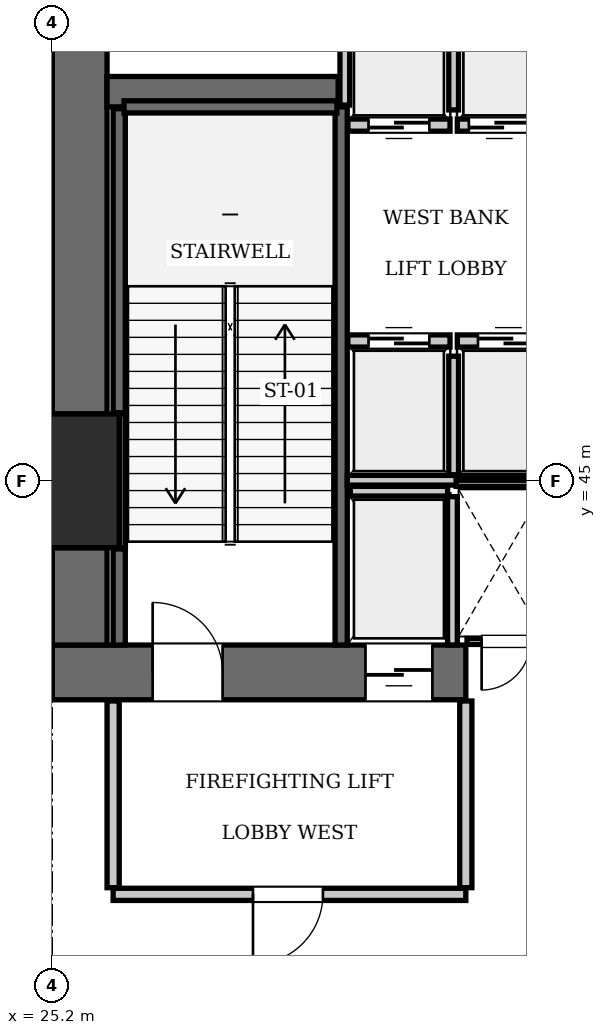
"""IFC4 building model, lengths in metres.
Left out: names, types, materials, properties, quantities, classifications, styles, units other than length and angle.
Written with IfcOpenShell. Run it as: python <this file> out.ifc"""

import sys

from ifc_helpers import new_model, si_unit, direction, frame, frame_2d, origin, origin_2d, place, context, subcontext, project, spatial, rectangle, extrude, element, fill, save


model = new_model("IFC4")
c1 = context("Model", 3, precision=1e-05, world=origin(), true_north=direction((0.0, 1.0)))
c2 = subcontext(c1, "Body", "Model", "MODEL_VIEW")
j1 = project(units=[si_unit("LENGTHUNIT", "METRE"), si_unit("PLANEANGLEUNIT", "RADIAN")], contexts=[c1])
p1 = place(None, origin())
s1 = spatial("IfcSite", under=j1, at=p1, CompositionType="ELEMENT")
p2 = place(p1, origin())
s2 = spatial("IfcBuilding", under=s1, at=p2, CompositionType="ELEMENT")
p3 = place(p2, frame((0.0, 0.0, 21.35)))
s3 = spatial("IfcBuildingStorey", under=s2, at=p3, CompositionType="ELEMENT", Elevation=21.35)
p4 = place(p3, frame((25.2, 45.0, 0.0), z_axis=(0.0, 0.0, 1.0), x_axis=(1.0, 0.0, 0.0)))
e1 = element("IfcColumn", 1, at=p4, inside=s3, PredefinedType="COLUMN", context=c2, shape_type="SweptSolid", body=[
    extrude(rectangle(XDim=2.2, YDim=2.2, at=origin_2d()), origin(), (0.0, 0.0, 1.0), 5.6),
])
p5 = place(p3, frame((25.2, 41.85, 0.0), z_axis=(0.0, 0.0, 1.0), x_axis=(1.0, 0.0, 0.0)))
e2 = element("IfcWall", 2, at=p5, inside=s3, PredefinedType="SHEAR", context=c2, shape_type="SweptSolid", body=[
    extrude(rectangle(XDim=6.8, YDim=0.9, at=frame_2d((3.4, 0.0))), origin(), (0.0, 0.0, 1.0), 5.6),
])
p6 = place(p5, frame((1.65, 0.0, 0.0)))
e3 = element("IfcOpeningElement", 3, at=p6, cuts=e2, PredefinedType="OPENING", context=c2, shape_type="SweptSolid", body=[
    extrude(rectangle(XDim=1.15, YDim=2.15, at=frame_2d((0.575, 1.075))), frame((0.0, 0.46, 0.0), z_axis=(0.0, -1.0, 0.0), x_axis=(1.0, 0.0, 0.0)), (0.0, 0.0, 1.0), 0.92),
])
p7 = place(p5, frame((5.15, 0.0, 0.0)))
e4 = element("IfcOpeningElement", 4, at=p7, cuts=e2, PredefinedType="OPENING", context=c2, shape_type="SweptSolid", body=[
    extrude(rectangle(XDim=1.1, YDim=2.2, at=frame_2d((0.55, 1.1))), frame((0.0, 0.46, 0.0), z_axis=(0.0, -1.0, 0.0), x_axis=(1.0, 0.0, 0.0)), (0.0, 0.0, 1.0), 0.92),
])
p8 = place(p3, frame((25.65, 42.3, 0.0), z_axis=(0.0, 0.0, 1.0), x_axis=(0.0, 1.0, 0.0)))
e5 = element("IfcWall", 5, at=p8, inside=s3, PredefinedType="SHEAR", context=c2, shape_type="SweptSolid", body=[
    extrude(rectangle(XDim=1.6, YDim=0.9, at=frame_2d((0.8, 0.0))), origin(), (0.0, 0.0, 1.0), 5.6),
])
p9 = place(p3, frame((25.65, 46.1, 0.0), z_axis=(0.0, 0.0, 1.0), x_axis=(0.0, 1.0, 0.0)))
e6 = element("IfcWall", 6, at=p9, inside=s3, PredefinedType="SHEAR", context=c2, shape_type="SweptSolid", body=[
    extrude(rectangle(XDim=7.0, YDim=0.9, at=frame_2d((3.5, 0.0))), origin(), (0.0, 0.0, 1.0), 5.6),
])
p10 = place(p3, frame((26.1, 51.4, 0.0), z_axis=(0.0, 0.0, 1.0), x_axis=(1.0, 0.0, 0.0)))
e7 = element("IfcWall", 7, at=p10, inside=s3, PredefinedType="SHEAR", context=c2, shape_type="SweptSolid", body=[
    extrude(rectangle(XDim=3.8, YDim=0.5, at=frame_2d((1.9, 0.0))), origin(), (0.0, 0.0, 1.0), 5.6),
])
p11 = place(p3, frame((29.95, 42.3, 0.0), z_axis=(0.0, 0.0, 1.0), x_axis=(0.0, 1.0, 0.0)))
e8 = element("IfcWall", 8, at=p11, inside=s3, PredefinedType="SOLIDWALL", context=c2, shape_type="SweptSolid", body=[
    extrude(rectangle(XDim=8.85, YDim=0.2, at=frame_2d((4.425, 0.0))), origin(), (0.0, 0.0, 1.0), 5.36),
])
p12 = place(p3, frame((26.3, 42.3, 0.0), z_axis=(0.0, 0.0, 1.0), x_axis=(0.0, 1.0, 0.0)))
e9 = element("IfcWall", 9, at=p12, inside=s3, PredefinedType="SOLIDWALL", context=c2, shape_type="SweptSolid", body=[
    extrude(rectangle(XDim=1.58, YDim=0.2, at=frame_2d((0.79, 0.0))), origin(), (0.0, 0.0, 1.0), 5.36),
])
p13 = place(p3, frame((26.3, 46.12, 0.0), z_axis=(0.0, 0.0, 1.0), x_axis=(0.0, 1.0, 0.0)))
e10 = element("IfcWall", 10, at=p13, inside=s3, PredefinedType="SOLIDWALL", context=c2, shape_type="SweptSolid", body=[
    extrude(rectangle(XDim=5.0, YDim=0.2, at=frame_2d((2.5, 0.0))), origin(), (0.0, 0.0, 1.0), 5.36),
])
p14 = place(p3, frame((26.38, 51.15, 0.0), z_axis=(0.0, 0.0, 1.0), x_axis=(1.0, 0.0, 0.0)))
e11 = element("IfcWall", 11, at=p14, inside=s3, PredefinedType="SOLIDWALL", context=c2, shape_type="SweptSolid", body=[
    extrude(rectangle(XDim=3.5, YDim=0.2, at=frame_2d((1.75, 0.0))), origin(), (0.0, 0.0, 1.0), 5.36),
])
p15 = place(p3, frame((26.352, 43.9, 0.0), z_axis=(0.0, 0.0, 1.0), x_axis=(0.0, 1.0, 0.0)))
e12 = element("IfcWall", 12, at=p15, inside=s3, PredefinedType="SOLIDWALL", context=c2, shape_type="SweptSolid", body=[
    extrude(rectangle(XDim=2.2, YDim=0.1, at=frame_2d((1.1, 0.0))), origin(), (0.0, 0.0, 1.0), 5.36),
])
p16 = place(p3, frame((30.06, 47.3, 0.0), z_axis=(0.0, 0.0, 1.0), x_axis=(1.0, 0.0, 0.0)))
e13 = element("IfcWall", 13, at=p16, inside=s3, PredefinedType="SOLIDWALL", context=c2, shape_type="SweptSolid", body=[
    extrude(rectangle(XDim=1.68, YDim=0.2, at=frame_2d((0.84, 0.0))), origin(), (0.0, 0.0, 1.0), 5.36),
])
p17 = place(p16, frame((0.34, 0.0, 0.0)))
e14 = element("IfcOpeningElement", 14, at=p17, cuts=e13, PredefinedType="OPENING", context=c2, shape_type="SweptSolid", body=[
    extrude(rectangle(XDim=1.0, YDim=2.15, at=frame_2d((0.5, 1.075))), frame((0.0, 0.11, 0.0), z_axis=(0.0, -1.0, 0.0), x_axis=(1.0, 0.0, 0.0)), (0.0, 0.0, 1.0), 0.22),
])
p18 = place(p3, frame((31.86, 47.3, 0.0), z_axis=(0.0, 0.0, 1.0), x_axis=(1.0, 0.0, 0.0)))
e15 = element("IfcWall", 15, at=p18, inside=s3, PredefinedType="SOLIDWALL", context=c2, shape_type="SweptSolid", body=[
    extrude(rectangle(XDim=1.68, YDim=0.2, at=frame_2d((0.84, 0.0))), origin(), (0.0, 0.0, 1.0), 5.36),
])
p19 = place(p18, frame((0.34, 0.0, 0.0)))
e16 = element("IfcOpeningElement", 16, at=p19, cuts=e15, PredefinedType="OPENING", context=c2, shape_type="SweptSolid", body=[
    extrude(rectangle(XDim=1.0, YDim=2.15, at=frame_2d((0.5, 1.075))), frame((0.0, 0.11, 0.0), z_axis=(0.0, -1.0, 0.0), x_axis=(1.0, 0.0, 0.0)), (0.0, 0.0, 1.0), 0.22),
])
p20 = place(p3, frame((30.06, 50.85, 0.0), z_axis=(0.0, 0.0, 1.0), x_axis=(1.0, 0.0, 0.0)))
e17 = element("IfcWall", 17, at=p20, inside=s3, PredefinedType="SOLIDWALL", context=c2, shape_type="SweptSolid", body=[
    extrude(rectangle(XDim=1.68, YDim=0.2, at=frame_2d((0.84, 0.0))), origin(), (0.0, 0.0, 1.0), 5.36),
])
p21 = place(p20, frame((0.34, 0.0, 0.0)))
e18 = element("IfcOpeningElement", 18, at=p21, cuts=e17, PredefinedType="OPENING", context=c2, shape_type="SweptSolid", body=[
    extrude(rectangle(XDim=1.0, YDim=2.15, at=frame_2d((0.5, 1.075))), frame((0.0, 0.11, 0.0), z_axis=(0.0, -1.0, 0.0), x_axis=(1.0, 0.0, 0.0)), (0.0, 0.0, 1.0), 0.22),
])
p22 = place(p3, frame((31.86, 50.85, 0.0), z_axis=(0.0, 0.0, 1.0), x_axis=(1.0, 0.0, 0.0)))
e19 = element("IfcWall", 19, at=p22, inside=s3, PredefinedType="SOLIDWALL", context=c2, shape_type="SweptSolid", body=[
    extrude(rectangle(XDim=1.38, YDim=0.2, at=frame_2d((0.69, 0.0))), origin(), (0.0, 0.0, 1.0), 5.36),
])
p23 = place(p22, frame((0.19, 0.0, 0.0)))
e20 = element("IfcOpeningElement", 20, at=p23, cuts=e19, PredefinedType="OPENING", context=c2, shape_type="SweptSolid", body=[
    extrude(rectangle(XDim=1.0, YDim=2.15, at=frame_2d((0.5, 1.075))), frame((0.0, 0.11, 0.0), z_axis=(0.0, -1.0, 0.0), x_axis=(1.0, 0.0, 0.0)), (0.0, 0.0, 1.0), 0.22),
])
p24 = place(p3, frame((30.1, 44.83, 0.0), z_axis=(0.0, 0.0, 1.0), x_axis=(1.0, 0.0, 0.0)))
e21 = element("IfcWall", 21, at=p24, inside=s3, PredefinedType="SOLIDWALL", context=c2, shape_type="SweptSolid", body=[
    extrude(rectangle(XDim=1.6, YDim=0.16, at=frame_2d((0.8, 0.0))), origin(), (0.0, 0.0, 1.0), 5.36),
])
p25 = place(p3, frame((31.78, 42.3, 0.0), z_axis=(0.0, 0.0, 1.0), x_axis=(0.0, 1.0, 0.0)))
e22 = element("IfcWall", 22, at=p25, inside=s3, PredefinedType="SOLIDWALL", context=c2, shape_type="SweptSolid", body=[
    extrude(rectangle(XDim=2.44, YDim=0.16, at=frame_2d((1.22, 0.0))), origin(), (0.0, 0.0, 1.0), 5.36),
])
p26 = place(p3, frame((31.8, 45.1, 0.0), z_axis=(0.0, 0.0, 1.0), x_axis=(0.0, 1.0, 0.0)))
e23 = element("IfcWall", 23, at=p26, inside=s3, PredefinedType="SOLIDWALL", context=c2, shape_type="SweptSolid", body=[
    extrude(rectangle(XDim=1.95, YDim=0.16, at=frame_2d((0.975, 0.0))), origin(), (0.0, 0.0, 1.0), 5.36),
])
p27 = place(p3, frame((30.05, 45.01, 0.0), z_axis=(0.0, 0.0, 1.0), x_axis=(1.0, 0.0, 0.0)))
e24 = element("IfcWall", 24, at=p27, inside=s3, PredefinedType="SOLIDWALL", context=c2, shape_type="SweptSolid", body=[
    extrude(rectangle(XDim=3.45, YDim=0.16, at=frame_2d((1.725, 0.0))), origin(), (0.0, 0.0, 1.0), 5.36),
])
p28 = place(p3, frame((30.01, 51.18, 0.0), z_axis=(0.0, 0.0, 1.0), x_axis=(0.0, 1.0, 0.0)))
e25 = element("IfcWall", 25, at=p28, inside=s3, PredefinedType="SOLIDWALL", context=c2, shape_type="SweptSolid", body=[
    extrude(rectangle(XDim=1.92, YDim=0.16, at=frame_2d((0.96, 0.0))), origin(), (0.0, 0.0, 1.0), 5.36),
])
p29 = place(p3, frame((31.8, 51.1, 0.0), z_axis=(0.0, 0.0, 1.0), x_axis=(0.0, 1.0, 0.0)))
e26 = element("IfcWall", 26, at=p29, inside=s3, PredefinedType="SOLIDWALL", context=c2, shape_type="SweptSolid", body=[
    extrude(rectangle(XDim=2.0, YDim=0.16, at=frame_2d((1.0, 0.0))), origin(), (0.0, 0.0, 1.0), 5.36),
])
p30 = place(p3, frame((26.2, 38.2, 0.0), z_axis=(0.0, 0.0, 1.0), x_axis=(1.0, 0.0, 0.0)))
e27 = element("IfcWall", 27, at=p30, inside=s3, PredefinedType="PARTITIONING", context=c2, shape_type="SweptSolid", body=[
    extrude(rectangle(XDim=5.8, YDim=0.2, at=frame_2d((2.9, 0.0))), origin(), (0.0, 0.0, 1.0), 5.36),
])
p31 = place(p30, frame((2.3, 0.0, 0.0)))
e28 = element("IfcOpeningElement", 28, at=p31, cuts=e27, PredefinedType="OPENING", context=c2, shape_type="SweptSolid", body=[
    extrude(rectangle(XDim=1.15, YDim=2.15, at=frame_2d((0.575, 1.075))), frame((0.0, 0.11, 0.0), z_axis=(0.0, -1.0, 0.0), x_axis=(1.0, 0.0, 0.0)), (0.0, 0.0, 1.0), 0.22),
])
for number, where, z_axis, x_axis in (
    (29, (26.2, 38.31, 0.0), (0.0, 0.0, 1.0), (0.0, 1.0, 0.0)),
    (30, (32.0, 38.31, 0.0), (0.0, 0.0, 1.0), (0.0, 1.0, 0.0)),
):
    element("IfcWall", number, at=place(p3, frame(where, z_axis=z_axis, x_axis=x_axis)), inside=s3, PredefinedType="PARTITIONING", context=c2, shape_type="SweptSolid", body=[
        extrude(rectangle(XDim=3.07, YDim=0.2, at=frame_2d((1.535, 0.0))), origin(), (0.0, 0.0, 1.0), 5.36),
    ])
p32 = place(p3, frame((32.02, 42.36, 0.0), z_axis=(0.0, 0.0, 1.0), x_axis=(1.0, 0.0, 0.0)))
e31 = element("IfcWall", 31, at=p32, inside=s3, PredefinedType="PARTITIONING", context=c2, shape_type="SweptSolid", body=[
    extrude(rectangle(XDim=1.32, YDim=0.1, at=frame_2d((0.66, 0.0))), origin(), (0.0, 0.0, 1.0), 5.36),
])
p33 = place(p32, frame((0.24, 0.0, 0.0)))
e32 = element("IfcOpeningElement", 32, at=p33, cuts=e31, PredefinedType="OPENING", context=c2, shape_type="SweptSolid", body=[
    extrude(rectangle(XDim=0.8, YDim=2.05, at=frame_2d((0.4, 1.025))), frame((0.0, 0.06, 0.0), z_axis=(0.0, -1.0, 0.0), x_axis=(1.0, 0.0, 0.0)), (0.0, 0.0, 1.0), 0.12),
])
p34 = place(p3, frame((31.84, 44.96, 0.0), z_axis=(0.0, 0.0, 1.0), x_axis=(1.0, 0.0, 0.0)))
e33 = element("IfcWall", 33, at=p34, inside=s3, PredefinedType="PARTITIONING", context=c2, shape_type="SweptSolid", body=[
    extrude(rectangle(XDim=1.48, YDim=0.1, at=frame_2d((0.74, 0.0))), origin(), (0.0, 0.0, 1.0), 5.36),
])
p35 = place(p6, origin())
e34 = element("IfcDoor", 34, at=p35, inside=s3, OperationType="SINGLE_SWING_LEFT", PredefinedType="DOOR", context=c2, shape_type="SweptSolid", body=[
    extrude(rectangle(XDim=1.15, YDim=2.15, at=frame_2d((0.575, 1.075))), frame((0.0, 0.025, 0.0), z_axis=(0.0, -1.0, 0.0), x_axis=(1.0, 0.0, 0.0)), (0.0, 0.0, 1.0), 0.05),
])
fill(e3, e34)
p36 = place(p17, origin())
e35 = element("IfcDoor", 35, at=p36, inside=s3, OperationType="SLIDING_TO_LEFT", PredefinedType="DOOR", context=c2, shape_type="SweptSolid", body=[
    extrude(rectangle(XDim=1.0, YDim=2.15, at=frame_2d((0.5, 1.075))), frame((0.0, 0.025, 0.0), z_axis=(0.0, -1.0, 0.0), x_axis=(1.0, 0.0, 0.0)), (0.0, 0.0, 1.0), 0.05),
])
fill(e14, e35)
p37 = place(p19, origin())
e36 = element("IfcDoor", 36, at=p37, inside=s3, OperationType="SLIDING_TO_LEFT", PredefinedType="DOOR", context=c2, shape_type="SweptSolid", body=[
    extrude(rectangle(XDim=1.0, YDim=2.15, at=frame_2d((0.5, 1.075))), frame((0.0, 0.025, 0.0), z_axis=(0.0, -1.0, 0.0), x_axis=(1.0, 0.0, 0.0)), (0.0, 0.0, 1.0), 0.05),
])
fill(e16, e36)
p38 = place(p21, frame((1.0, 0.0, 0.0), z_axis=(0.0, 0.0, 1.0), x_axis=(-1.0, 0.0, 0.0)))
e37 = element("IfcDoor", 37, at=p38, inside=s3, OperationType="SLIDING_TO_LEFT", PredefinedType="DOOR", context=c2, shape_type="SweptSolid", body=[
    extrude(rectangle(XDim=1.0, YDim=2.15, at=frame_2d((0.5, 1.075))), frame((0.0, 0.025, 0.0), z_axis=(0.0, -1.0, 0.0), x_axis=(1.0, 0.0, 0.0)), (0.0, 0.0, 1.0), 0.05),
])
fill(e18, e37)
p39 = place(p23, frame((1.0, 0.0, 0.0), z_axis=(0.0, 0.0, 1.0), x_axis=(-1.0, 0.0, 0.0)))
e38 = element("IfcDoor", 38, at=p39, inside=s3, OperationType="SLIDING_TO_LEFT", PredefinedType="DOOR", context=c2, shape_type="SweptSolid", body=[
    extrude(rectangle(XDim=1.0, YDim=2.15, at=frame_2d((0.5, 1.075))), frame((0.0, 0.025, 0.0), z_axis=(0.0, -1.0, 0.0), x_axis=(1.0, 0.0, 0.0)), (0.0, 0.0, 1.0), 0.05),
])
fill(e20, e38)
p40 = place(p7, frame((1.1, 0.0, 0.0), z_axis=(0.0, 0.0, 1.0), x_axis=(-1.0, 0.0, 0.0)))
e39 = element("IfcDoor", 39, at=p40, inside=s3, OperationType="SLIDING_TO_LEFT", PredefinedType="DOOR", context=c2, shape_type="SweptSolid", body=[
    extrude(rectangle(XDim=1.1, YDim=2.2, at=frame_2d((0.55, 1.1))), frame((0.0, 0.025, 0.0), z_axis=(0.0, -1.0, 0.0), x_axis=(1.0, 0.0, 0.0)), (0.0, 0.0, 1.0), 0.05),
])
fill(e4, e39)
p41 = place(p31, frame((1.15, 0.0, 0.0), z_axis=(0.0, 0.0, 1.0), x_axis=(-1.0, 0.0, 0.0)))
e40 = element("IfcDoor", 40, at=p41, inside=s3, OperationType="SINGLE_SWING_RIGHT", PredefinedType="DOOR", context=c2, shape_type="SweptSolid", body=[
    extrude(rectangle(XDim=1.15, YDim=2.15, at=frame_2d((0.575, 1.075))), frame((0.0, 0.025, 0.0), z_axis=(0.0, -1.0, 0.0), x_axis=(1.0, 0.0, 0.0)), (0.0, 0.0, 1.0), 0.05),
])
fill(e28, e40)
p42 = place(p33, frame((0.8, 0.0, 0.0), z_axis=(0.0, 0.0, 1.0), x_axis=(-1.0, 0.0, 0.0)))
e41 = element("IfcDoor", 41, at=p42, inside=s3, OperationType="SINGLE_SWING_RIGHT", PredefinedType="DOOR", context=c2, shape_type="SweptSolid", body=[
    extrude(rectangle(XDim=0.8, YDim=2.05, at=frame_2d((0.4, 1.025))), frame((0.0, 0.025, 0.0), z_axis=(0.0, -1.0, 0.0), x_axis=(1.0, 0.0, 0.0)), (0.0, 0.0, 1.0), 0.05),
])
fill(e32, e41)
save(model, sys.argv[1])
